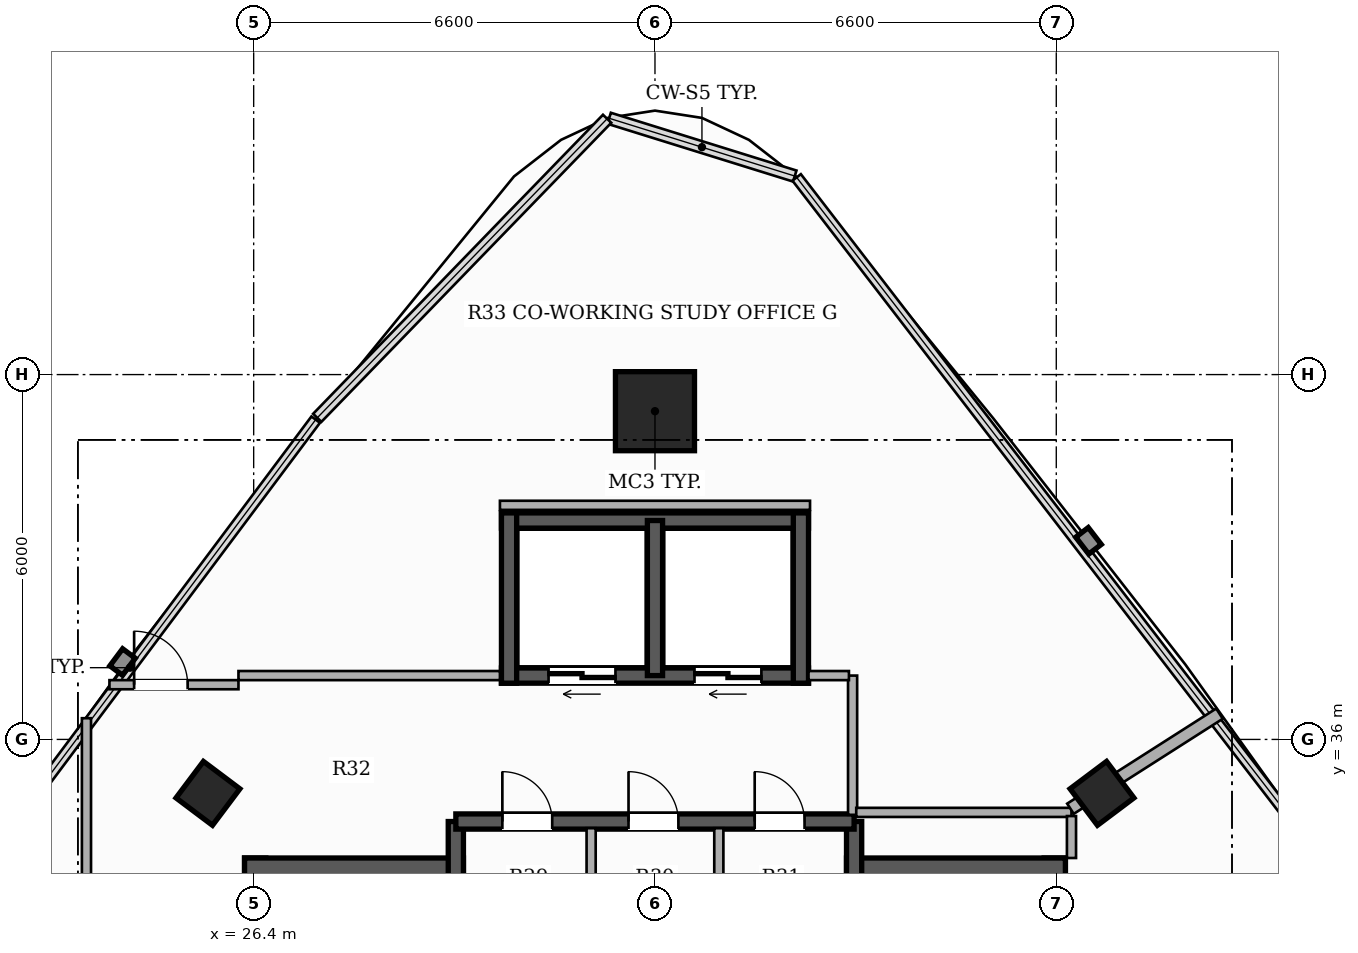
"""IFC4 building model, lengths in metres.
Left out: names, types, materials, properties, quantities, classifications, styles, units other than length and angle.
Written with IfcOpenShell. Run it as: python <this file> out.ifc"""

import sys

from ifc_helpers import new_model, si_unit, direction, frame, frame_2d, origin, origin_2d, place, context, subcontext, project, spatial, rectangle, hollow_rectangle, extrude, element, fill, save


model = new_model("IFC4")
c1 = context("Model", 3, precision=1e-05, world=origin(), true_north=direction((0.0, 1.0)))
c2 = subcontext(c1, "Body", "Model", "MODEL_VIEW")
j1 = project(units=[si_unit("LENGTHUNIT", "METRE"), si_unit("PLANEANGLEUNIT", "RADIAN")], contexts=[c1])
p1 = place(None, origin())
s1 = spatial("IfcSite", under=j1, at=p1, CompositionType="ELEMENT")
p2 = place(p1, origin())
s2 = spatial("IfcBuilding", under=s1, at=p2, CompositionType="ELEMENT")
p3 = place(p2, frame((0.0, 0.0, 209.6)))
s3 = spatial("IfcBuildingStorey", under=s2, at=p3, CompositionType="ELEMENT", Elevation=209.6)
p4 = place(p3, frame((26.425, 26.55, 0.0), z_axis=(0.0, 0.0, 1.0), x_axis=(0.0, 1.0, 0.0)))
e1 = element("IfcWall", 1, at=p4, inside=s3, PredefinedType="SHEAR", context=c2, shape_type="SweptSolid", body=[
    extrude(rectangle(XDim=7.5, YDim=0.35, at=frame_2d((3.75, 0.0))), origin(), (0.0, 0.0, 1.0), 3.3),
])
p5 = place(p3, frame((26.25, 33.875, 0.0), z_axis=(0.0, 0.0, 1.0), x_axis=(1.0, 0.0, 0.0)))
e2 = element("IfcWall", 2, at=p5, inside=s3, PredefinedType="SHEAR", context=c2, shape_type="SweptSolid", body=[
    extrude(rectangle(XDim=3.6, YDim=0.35, at=frame_2d((1.8, 0.0))), origin(), (0.0, 0.0, 1.0), 3.3),
])
p6 = place(p3, frame((39.575, 26.55, 0.0), z_axis=(0.0, 0.0, 1.0), x_axis=(0.0, 1.0, 0.0)))
e3 = element("IfcWall", 3, at=p6, inside=s3, PredefinedType="SHEAR", context=c2, shape_type="SweptSolid", body=[
    extrude(rectangle(XDim=7.5, YDim=0.35, at=frame_2d((3.75, 0.0))), origin(), (0.0, 0.0, 1.0), 3.3),
])
p7 = place(p3, frame((36.15, 33.875, 0.0), z_axis=(0.0, 0.0, 1.0), x_axis=(1.0, 0.0, 0.0)))
e4 = element("IfcWall", 4, at=p7, inside=s3, PredefinedType="SHEAR", context=c2, shape_type="SweptSolid", body=[
    extrude(rectangle(XDim=3.6, YDim=0.35, at=frame_2d((1.8, 0.0))), origin(), (0.0, 0.0, 1.0), 3.3),
])
p8 = place(p3, frame((29.725, 26.55, 0.0), z_axis=(0.0, 0.0, 1.0), x_axis=(0.0, 1.0, 0.0)))
e5 = element("IfcWall", 5, at=p8, inside=s3, PredefinedType="SHEAR", context=c2, shape_type="SweptSolid", body=[
    extrude(rectangle(XDim=8.1, YDim=0.25, at=frame_2d((4.05, 0.0))), origin(), (0.0, 0.0, 1.0), 3.3),
])
p9 = place(p8, frame((0.6, 0.0, 0.0)))
e6 = element("IfcOpeningElement", 6, at=p9, cuts=e5, PredefinedType="OPENING", context=c2, shape_type="SweptSolid", body=[
    extrude(rectangle(XDim=1.05, YDim=2.15, at=frame_2d((0.525, 1.075))), frame((0.0, 0.135, 0.0), z_axis=(0.0, -1.0, 0.0), x_axis=(1.0, 0.0, 0.0)), (0.0, 0.0, 1.0), 0.27),
])
p10 = place(p3, frame((36.275, 26.55, 0.0), z_axis=(0.0, 0.0, 1.0), x_axis=(0.0, 1.0, 0.0)))
e7 = element("IfcWall", 7, at=p10, inside=s3, PredefinedType="SHEAR", context=c2, shape_type="SweptSolid", body=[
    extrude(rectangle(XDim=8.1, YDim=0.25, at=frame_2d((4.05, 0.0))), origin(), (0.0, 0.0, 1.0), 3.3),
])
p11 = place(p10, frame((0.6, 0.0, 0.0)))
e8 = element("IfcOpeningElement", 8, at=p11, cuts=e7, PredefinedType="OPENING", context=c2, shape_type="SweptSolid", body=[
    extrude(rectangle(XDim=1.05, YDim=2.15, at=frame_2d((0.525, 1.075))), frame((0.0, 0.135, 0.0), z_axis=(0.0, -1.0, 0.0), x_axis=(1.0, 0.0, 0.0)), (0.0, 0.0, 1.0), 0.27),
])
p12 = place(p3, frame((29.725, 34.65, 0.0), z_axis=(0.0, 0.0, 1.0), x_axis=(1.0, 0.0, 0.0)))
e9 = element("IfcWall", 9, at=p12, inside=s3, PredefinedType="SHEAR", context=c2, shape_type="SweptSolid", body=[
    extrude(rectangle(XDim=6.55, YDim=0.25, at=frame_2d((3.275, 0.0))), origin(), (0.0, 0.0, 1.0), 3.3),
])
p13 = place(p12, frame((0.765, 0.0, 0.0)))
e10 = element("IfcOpeningElement", 10, at=p13, cuts=e9, PredefinedType="OPENING", context=c2, shape_type="SweptSolid", body=[
    extrude(rectangle(XDim=0.82, YDim=2.1, at=frame_2d((0.41, 1.05))), frame((0.0, 0.135, 0.0), z_axis=(0.0, -1.0, 0.0), x_axis=(1.0, 0.0, 0.0)), (0.0, 0.0, 1.0), 0.27),
])
p14 = place(p12, frame((2.84, 0.0, 0.0)))
e11 = element("IfcOpeningElement", 11, at=p14, cuts=e9, PredefinedType="OPENING", context=c2, shape_type="SweptSolid", body=[
    extrude(rectangle(XDim=0.82, YDim=2.1, at=frame_2d((0.41, 1.05))), frame((0.0, 0.135, 0.0), z_axis=(0.0, -1.0, 0.0), x_axis=(1.0, 0.0, 0.0)), (0.0, 0.0, 1.0), 0.27),
])
p15 = place(p12, frame((4.915, 0.0, 0.0)))
e12 = element("IfcOpeningElement", 12, at=p15, cuts=e9, PredefinedType="OPENING", context=c2, shape_type="SweptSolid", body=[
    extrude(rectangle(XDim=0.82, YDim=2.1, at=frame_2d((0.41, 1.05))), frame((0.0, 0.135, 0.0), z_axis=(0.0, -1.0, 0.0), x_axis=(1.0, 0.0, 0.0)), (0.0, 0.0, 1.0), 0.27),
])
p16 = place(p3, frame((35.525, 37.05, 0.0), z_axis=(0.0, 0.0, 1.0), x_axis=(-1.0, 0.0, 0.0)))
e13 = element("IfcWall", 13, at=p16, inside=s3, PredefinedType="SHEAR", context=c2, shape_type="SweptSolid", body=[
    extrude(rectangle(XDim=5.05, YDim=0.25, at=frame_2d((2.525, 0.0))), origin(), (0.0, 0.0, 1.0), 3.3),
])
p17 = place(p16, frame((3.175, 0.0, 0.0)))
e14 = element("IfcOpeningElement", 14, at=p17, cuts=e13, PredefinedType="OPENING", context=c2, shape_type="SweptSolid", body=[
    extrude(rectangle(XDim=1.1, YDim=2.2, at=frame_2d((0.55, 1.1))), frame((0.0, 0.135, 0.0), z_axis=(0.0, -1.0, 0.0), x_axis=(1.0, 0.0, 0.0)), (0.0, 0.0, 1.0), 0.27),
])
p18 = place(p16, frame((0.775, 0.0, 0.0)))
e15 = element("IfcOpeningElement", 15, at=p18, cuts=e13, PredefinedType="OPENING", context=c2, shape_type="SweptSolid", body=[
    extrude(rectangle(XDim=1.1, YDim=2.2, at=frame_2d((0.55, 1.1))), frame((0.0, 0.135, 0.0), z_axis=(0.0, -1.0, 0.0), x_axis=(1.0, 0.0, 0.0)), (0.0, 0.0, 1.0), 0.27),
])
p19 = place(p3, frame((30.475, 39.6, 0.0), z_axis=(0.0, 0.0, 1.0), x_axis=(1.0, 0.0, 0.0)))
e16 = element("IfcWall", 16, at=p19, inside=s3, PredefinedType="SHEAR", context=c2, shape_type="SweptSolid", body=[
    extrude(rectangle(XDim=5.05, YDim=0.25, at=frame_2d((2.525, 0.0))), origin(), (0.0, 0.0, 1.0), 3.3),
])
for number, where, z_axis, x_axis in (
    (17, (30.6, 36.925, 0.0), (0.0, 0.0, 1.0), (0.0, 1.0, 0.0)),
    (18, (35.4, 36.925, 0.0), (0.0, 0.0, 1.0), (0.0, 1.0, 0.0)),
):
    element("IfcWall", number, at=place(p3, frame(where, z_axis=z_axis, x_axis=x_axis)), inside=s3, PredefinedType="SHEAR", context=c2, shape_type="SweptSolid", body=[
        extrude(rectangle(XDim=2.8, YDim=0.25, at=frame_2d((1.4, 0.0))), origin(), (0.0, 0.0, 1.0), 3.3),
    ])
p20 = place(p3, frame((33.0, 37.05, 0.0), z_axis=(0.0, 0.0, 1.0), x_axis=(0.0, 1.0, 0.0)))
e19 = element("IfcWall", 19, at=p20, inside=s3, PredefinedType="SHEAR", context=c2, shape_type="SweptSolid", body=[
    extrude(rectangle(XDim=2.55, YDim=0.25, at=frame_2d((1.275, 0.0))), origin(), (0.0, 0.0, 1.0), 3.3),
])
p21 = place(p3, frame((33.0, 41.398, 0.0), z_axis=(0.0, 0.0, 1.0), x_axis=(1.0, 0.0, 0.0)))
e20 = element("IfcColumn", 20, at=p21, inside=s3, PredefinedType="COLUMN", context=c2, shape_type="SweptSolid", body=[
    extrude(hollow_rectangle(XDim=1.3, YDim=1.3, WallThickness=0.04, at=origin_2d()), origin(), (0.0, 0.0, 1.0), 3.3),
])
for number, where, z_axis, x_axis in (
    (21, (25.648, 35.113, 0.0), (0.0, 0.0, 1.0), (0.6, 0.8, 0.0)),
    (22, (40.352, 35.113, 0.0), (0.0, 0.0, 1.0), (-0.6, 0.8, 0.0)),
):
    element("IfcColumn", number, at=place(p3, frame(where, z_axis=z_axis, x_axis=x_axis)), inside=s3, PredefinedType="COLUMN", context=c2, shape_type="SweptSolid", body=[
        extrude(hollow_rectangle(XDim=0.75, YDim=0.75, WallThickness=0.025, at=origin_2d()), origin(), (0.0, 0.0, 1.0), 3.3),
    ])
p22 = place(p3, frame((36.25, 34.76, 0.0), z_axis=(0.0, 0.0, 1.0), x_axis=(0.0, 1.0, 0.0)))
e23 = element("IfcWall", 23, at=p22, inside=s3, PredefinedType="PARTITIONING", context=c2, shape_type="SweptSolid", body=[
    extrude(rectangle(XDim=2.29, YDim=0.15, at=frame_2d((1.145, 0.0))), origin(), (0.0, 0.0, 1.0), 2.425),
])
p23 = place(p3, frame((35.525, 37.05, 0.0), z_axis=(0.0, 0.0, 1.0), x_axis=(1.0, 0.0, 0.0)))
e24 = element("IfcWall", 24, at=p23, inside=s3, PredefinedType="PARTITIONING", context=c2, shape_type="SweptSolid", body=[
    extrude(rectangle(XDim=0.665, YDim=0.15, at=frame_2d((0.333, 0.0))), origin(), (0.0, 0.0, 1.0), 2.425),
])
for number, where, z_axis, x_axis in (
    (25, (31.95, 32.885, 0.0), (0.0, 0.0, 1.0), (0.0, 1.0, 0.0)),
    (26, (34.05, 32.885, 0.0), (0.0, 0.0, 1.0), (0.0, 1.0, 0.0)),
):
    element("IfcWall", number, at=place(p3, frame(where, z_axis=z_axis, x_axis=x_axis)), inside=s3, PredefinedType="PARTITIONING", context=c2, shape_type="SweptSolid", body=[
        extrude(rectangle(XDim=1.655, YDim=0.15, at=frame_2d((0.828, 0.0))), origin(), (0.0, 0.0, 1.0), 3.06),
    ])
p24 = place(p3, frame((23.65, 23.91, 0.0), z_axis=(0.0, 0.0, 1.0), x_axis=(0.0, 1.0, 0.0)))
e27 = element("IfcWall", 27, at=p24, inside=s3, PredefinedType="PARTITIONING", context=c2, shape_type="SweptSolid", body=[
    extrude(rectangle(XDim=12.439, YDim=0.15, at=frame_2d((6.22, 0.0))), origin(), (0.0, 0.0, 1.0), 2.492),
])
p25 = place(p24, frame((5.759, 0.0, 0.0)))
e28 = element("IfcOpeningElement", 28, at=p25, cuts=e27, PredefinedType="OPENING", context=c2, shape_type="SweptSolid", body=[
    extrude(rectangle(XDim=0.92, YDim=2.15, at=frame_2d((0.46, 1.075))), frame((0.0, 0.085, 0.0), z_axis=(0.0, -1.0, 0.0), x_axis=(1.0, 0.0, 0.0)), (0.0, 0.0, 1.0), 0.17),
])
p26 = place(p3, frame((24.028, 36.9, 0.0), z_axis=(0.0, 0.0, 1.0), x_axis=(1.0, 0.0, 0.0)))
e29 = element("IfcWall", 29, at=p26, inside=s3, PredefinedType="PARTITIONING", context=c2, shape_type="SweptSolid", body=[
    extrude(rectangle(XDim=2.122, YDim=0.15, at=frame_2d((1.061, 0.0))), origin(), (0.0, 0.0, 1.0), 2.619),
])
p27 = place(p26, frame((0.406, 0.0, 0.0)))
e30 = element("IfcOpeningElement", 30, at=p27, cuts=e29, PredefinedType="OPENING", context=c2, shape_type="SweptSolid", body=[
    extrude(rectangle(XDim=0.88, YDim=2.1, at=frame_2d((0.44, 1.05))), frame((0.0, 0.085, 0.0), z_axis=(0.0, -1.0, 0.0), x_axis=(1.0, 0.0, 0.0)), (0.0, 0.0, 1.0), 0.17),
])
p28 = place(p3, frame((26.15, 37.05, 0.0), z_axis=(0.0, 0.0, 1.0), x_axis=(1.0, 0.0, 0.0)))
e31 = element("IfcWall", 31, at=p28, inside=s3, PredefinedType="PARTITIONING", context=c2, shape_type="SweptSolid", body=[
    extrude(rectangle(XDim=4.3, YDim=0.15, at=frame_2d((2.15, 0.0))), origin(), (0.0, 0.0, 1.0), 2.425),
])
p29 = place(p3, frame((30.45, 39.85, 0.0), z_axis=(0.0, 0.0, 1.0), x_axis=(1.0, 0.0, 0.0)))
e32 = element("IfcWall", 32, at=p29, inside=s3, PredefinedType="PARTITIONING", context=c2, shape_type="SweptSolid", body=[
    extrude(rectangle(XDim=5.1, YDim=0.15, at=frame_2d((2.55, 0.0))), origin(), (0.0, 0.0, 1.0), 2.492),
])
p30 = place(p3, frame((36.31, 34.8, 0.0), z_axis=(0.0, 0.0, 1.0), x_axis=(1.0, 0.0, 0.0)))
e33 = element("IfcWall", 33, at=p30, inside=s3, PredefinedType="PARTITIONING", context=c2, shape_type="SweptSolid", body=[
    extrude(rectangle(XDim=3.54, YDim=0.15, at=frame_2d((1.77, 0.0))), origin(), (0.0, 0.0, 1.0), 2.425),
])
p31 = place(p3, frame((39.85, 34.74, 0.0), z_axis=(0.0, 0.0, 1.0), x_axis=(0.0, -1.0, 0.0)))
e34 = element("IfcWall", 34, at=p31, inside=s3, PredefinedType="PARTITIONING", context=c2, shape_type="SweptSolid", body=[
    extrude(rectangle(XDim=0.69, YDim=0.15, at=frame_2d((0.345, 0.0))), origin(), (0.0, 0.0, 1.0), 2.773),
])
p32 = place(p3, frame((39.833, 34.86, 0.0), z_axis=(0.0, 0.0, 1.0), x_axis=(0.842993506682, 0.537923737803, 0.0)))
e35 = element("IfcWall", 35, at=p32, inside=s3, PredefinedType="PARTITIONING", context=c2, shape_type="SweptSolid", body=[
    extrude(rectangle(XDim=2.907, YDim=0.2, at=frame_2d((1.454, 0.0))), origin(), (0.0, 0.0, 1.0), 2.492),
])
p33 = place(p17, origin())
e36 = element("IfcDoor", 36, at=p33, inside=s3, OperationType="DOUBLE_DOOR_SLIDING", PredefinedType="DOOR", context=c2, shape_type="SweptSolid", body=[
    extrude(rectangle(XDim=1.1, YDim=2.2, at=frame_2d((0.55, 1.1))), frame((0.0, 0.025, 0.0), z_axis=(0.0, -1.0, 0.0), x_axis=(1.0, 0.0, 0.0)), (0.0, 0.0, 1.0), 0.05),
])
fill(e14, e36)
p34 = place(p18, origin())
e37 = element("IfcDoor", 37, at=p34, inside=s3, OperationType="DOUBLE_DOOR_SLIDING", PredefinedType="DOOR", context=c2, shape_type="SweptSolid", body=[
    extrude(rectangle(XDim=1.1, YDim=2.2, at=frame_2d((0.55, 1.1))), frame((0.0, 0.025, 0.0), z_axis=(0.0, -1.0, 0.0), x_axis=(1.0, 0.0, 0.0)), (0.0, 0.0, 1.0), 0.05),
])
fill(e15, e37)
p35 = place(p13, origin())
e38 = element("IfcDoor", 38, at=p35, inside=s3, OperationType="SINGLE_SWING_LEFT", PredefinedType="DOOR", context=c2, shape_type="SweptSolid", body=[
    extrude(rectangle(XDim=0.82, YDim=2.1, at=frame_2d((0.41, 1.05))), frame((0.0, 0.025, 0.0), z_axis=(0.0, -1.0, 0.0), x_axis=(1.0, 0.0, 0.0)), (0.0, 0.0, 1.0), 0.05),
])
fill(e10, e38)
p36 = place(p14, origin())
e39 = element("IfcDoor", 39, at=p36, inside=s3, OperationType="SINGLE_SWING_LEFT", PredefinedType="DOOR", context=c2, shape_type="SweptSolid", body=[
    extrude(rectangle(XDim=0.82, YDim=2.1, at=frame_2d((0.41, 1.05))), frame((0.0, 0.025, 0.0), z_axis=(0.0, -1.0, 0.0), x_axis=(1.0, 0.0, 0.0)), (0.0, 0.0, 1.0), 0.05),
])
fill(e11, e39)
p37 = place(p15, origin())
e40 = element("IfcDoor", 40, at=p37, inside=s3, OperationType="SINGLE_SWING_LEFT", PredefinedType="DOOR", context=c2, shape_type="SweptSolid", body=[
    extrude(rectangle(XDim=0.82, YDim=2.1, at=frame_2d((0.41, 1.05))), frame((0.0, 0.025, 0.0), z_axis=(0.0, -1.0, 0.0), x_axis=(1.0, 0.0, 0.0)), (0.0, 0.0, 1.0), 0.05),
])
fill(e12, e40)
p38 = place(p27, origin())
e41 = element("IfcDoor", 41, at=p38, inside=s3, OperationType="SINGLE_SWING_LEFT", PredefinedType="DOOR", context=c2, shape_type="SweptSolid", body=[
    extrude(rectangle(XDim=0.88, YDim=2.1, at=frame_2d((0.44, 1.05))), frame((0.0, 0.025, 0.0), z_axis=(0.0, -1.0, 0.0), x_axis=(1.0, 0.0, 0.0)), (0.0, 0.0, 1.0), 0.05),
])
fill(e30, e41)
save(model, sys.argv[1])
